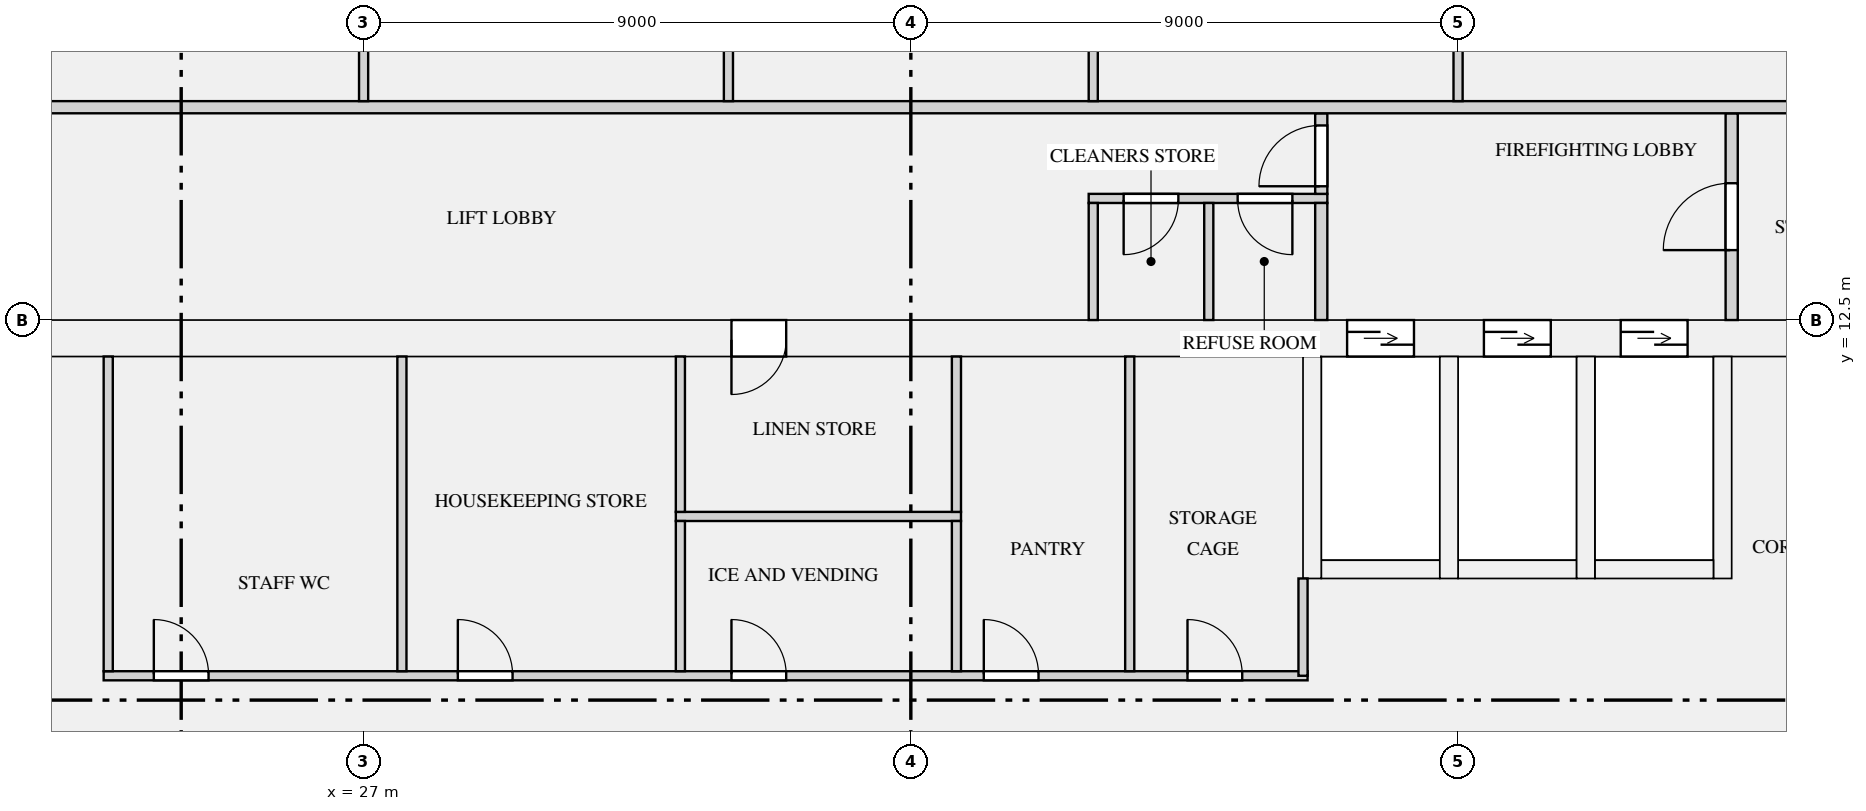
"""IFC4 building model, lengths in metres.
Left out: names, types, materials, properties, quantities, classifications, styles, units other than length and angle.
Written with IfcOpenShell. Run it as: python <this file> out.ifc"""

import sys

from ifc_helpers import new_model, si_unit, direction, frame, frame_2d, origin, place, context, subcontext, project, spatial, rectangle, extrude, element, fill, save


model = new_model("IFC4")
c1 = context("Model", 3, precision=1e-05, world=origin(), true_north=direction((0.0, 1.0)))
c2 = subcontext(c1, "Body", "Model", "MODEL_VIEW")
j1 = project(units=[si_unit("LENGTHUNIT", "METRE"), si_unit("PLANEANGLEUNIT", "RADIAN")], contexts=[c1])
p1 = place(None, origin())
s1 = spatial("IfcSite", under=j1, at=p1, CompositionType="ELEMENT")
p2 = place(p1, origin())
s2 = spatial("IfcBuilding", under=s1, at=p2, CompositionType="ELEMENT")
p3 = place(p2, frame((0.0, 0.0, 144.45)))
s3 = spatial("IfcBuildingStorey", under=s2, at=p3, CompositionType="ELEMENT", Elevation=144.45)
p4 = place(p3, frame((18.7, 12.2, 0.0), z_axis=(0.0, 0.0, 1.0), x_axis=(1.0, 0.0, 0.0)))
e1 = element("IfcWall", 1, at=p4, inside=s3, PredefinedType="SHEAR", context=c2, shape_type="SweptSolid", body=[
    extrude(rectangle(XDim=34.6, YDim=0.6, at=frame_2d((17.3, 0.0))), origin(), (0.0, 0.0, 1.0), 3.15),
])
p5 = place(p4, frame((24.475, 0.0, 0.0)))
e2 = element("IfcOpeningElement", 2, at=p5, cuts=e1, PredefinedType="OPENING", context=c2, shape_type="SweptSolid", body=[
    extrude(rectangle(XDim=1.1, YDim=2.1, at=frame_2d((0.55, 1.05))), frame((0.0, 0.31, 0.0), z_axis=(0.0, -1.0, 0.0), x_axis=(1.0, 0.0, 0.0)), (0.0, 0.0, 1.0), 0.62),
])
p6 = place(p4, frame((26.725, 0.0, 0.0)))
e3 = element("IfcOpeningElement", 3, at=p6, cuts=e1, PredefinedType="OPENING", context=c2, shape_type="SweptSolid", body=[
    extrude(rectangle(XDim=1.1, YDim=2.1, at=frame_2d((0.55, 1.05))), frame((0.0, 0.31, 0.0), z_axis=(0.0, -1.0, 0.0), x_axis=(1.0, 0.0, 0.0)), (0.0, 0.0, 1.0), 0.62),
])
p7 = place(p4, frame((28.975, 0.0, 0.0)))
e4 = element("IfcOpeningElement", 4, at=p7, cuts=e1, PredefinedType="OPENING", context=c2, shape_type="SweptSolid", body=[
    extrude(rectangle(XDim=1.1, YDim=2.1, at=frame_2d((0.55, 1.05))), frame((0.0, 0.31, 0.0), z_axis=(0.0, -1.0, 0.0), x_axis=(1.0, 0.0, 0.0)), (0.0, 0.0, 1.0), 0.62),
])
p8 = place(p4, frame((14.35, 0.0, 0.0)))
e5 = element("IfcOpeningElement", 5, at=p8, cuts=e1, PredefinedType="OPENING", context=c2, shape_type="SweptSolid", body=[
    extrude(rectangle(XDim=0.9, YDim=2.1, at=frame_2d((0.45, 1.05))), frame((0.0, 0.31, 0.0), z_axis=(0.0, -1.0, 0.0), x_axis=(1.0, 0.0, 0.0)), (0.0, 0.0, 1.0), 0.62),
])
p9 = place(p4, frame((1.45, 0.0, 0.0)))
e6 = element("IfcOpeningElement", 6, at=p9, cuts=e1, PredefinedType="OPENING", context=c2, shape_type="SweptSolid", body=[
    extrude(rectangle(XDim=1.2, YDim=2.1, at=frame_2d((0.6, 1.05))), frame((0.0, 0.31, 0.0), z_axis=(0.0, -1.0, 0.0), x_axis=(1.0, 0.0, 0.0)), (0.0, 0.0, 1.0), 0.62),
])
p10 = place(p4, frame((31.95, 0.0, 0.0)))
e7 = element("IfcOpeningElement", 7, at=p10, cuts=e1, PredefinedType="OPENING", context=c2, shape_type="SweptSolid", body=[
    extrude(rectangle(XDim=1.2, YDim=2.1, at=frame_2d((0.6, 1.05))), frame((0.0, 0.31, 0.0), z_axis=(0.0, -1.0, 0.0), x_axis=(1.0, 0.0, 0.0)), (0.0, 0.0, 1.0), 0.62),
])
p11 = place(p3, frame((42.75, 8.4, 0.0), z_axis=(0.0, 0.0, 1.0), x_axis=(1.0, 0.0, 0.0)))
e8 = element("IfcWall", 8, at=p11, inside=s3, PredefinedType="SHEAR", context=c2, shape_type="SweptSolid", body=[
    extrude(rectangle(XDim=1.95, YDim=0.3, at=frame_2d((0.975, 0.0))), origin(), (0.0, 0.0, 1.0), 3.15),
])
p12 = place(p3, frame((42.6, 8.25, 0.0), z_axis=(0.0, 0.0, 1.0), x_axis=(0.0, 1.0, 0.0)))
e9 = element("IfcWall", 9, at=p12, inside=s3, PredefinedType="SHEAR", context=c2, shape_type="SweptSolid", body=[
    extrude(rectangle(XDim=3.65, YDim=0.3, at=frame_2d((1.825, 0.0))), origin(), (0.0, 0.0, 1.0), 3.15),
])
p13 = place(p3, frame((45.0, 8.4, 0.0), z_axis=(0.0, 0.0, 1.0), x_axis=(1.0, 0.0, 0.0)))
e10 = element("IfcWall", 10, at=p13, inside=s3, PredefinedType="SHEAR", context=c2, shape_type="SweptSolid", body=[
    extrude(rectangle(XDim=1.95, YDim=0.3, at=frame_2d((0.975, 0.0))), origin(), (0.0, 0.0, 1.0), 3.15),
])
p14 = place(p3, frame((44.85, 8.25, 0.0), z_axis=(0.0, 0.0, 1.0), x_axis=(0.0, 1.0, 0.0)))
e11 = element("IfcWall", 11, at=p14, inside=s3, PredefinedType="SHEAR", context=c2, shape_type="SweptSolid", body=[
    extrude(rectangle(XDim=3.65, YDim=0.3, at=frame_2d((1.825, 0.0))), origin(), (0.0, 0.0, 1.0), 3.15),
])
p15 = place(p3, frame((47.25, 8.4, 0.0), z_axis=(0.0, 0.0, 1.0), x_axis=(1.0, 0.0, 0.0)))
e12 = element("IfcWall", 12, at=p15, inside=s3, PredefinedType="SHEAR", context=c2, shape_type="SweptSolid", body=[
    extrude(rectangle(XDim=1.95, YDim=0.3, at=frame_2d((0.975, 0.0))), origin(), (0.0, 0.0, 1.0), 3.15),
])
for number, where, z_axis, x_axis in (
    (13, (47.1, 8.25, 0.0), (0.0, 0.0, 1.0), (0.0, 1.0, 0.0)),
    (14, (49.35, 8.25, 0.0), (0.0, 0.0, 1.0), (0.0, 1.0, 0.0)),
):
    element("IfcWall", number, at=place(p3, frame(where, z_axis=z_axis, x_axis=x_axis)), inside=s3, PredefinedType="SHEAR", context=c2, shape_type="SweptSolid", body=[
        extrude(rectangle(XDim=3.65, YDim=0.3, at=frame_2d((1.825, 0.0))), origin(), (0.0, 0.0, 1.0), 3.15),
    ])
p16 = place(p3, frame((22.725, 6.65, 0.0), z_axis=(0.0, 0.0, 1.0), x_axis=(1.0, 0.0, 0.0)))
e15 = element("IfcWall", 15, at=p16, inside=s3, PredefinedType="PARTITIONING", context=c2, shape_type="SweptSolid", body=[
    extrude(rectangle(XDim=19.8, YDim=0.15, at=frame_2d((9.9, 0.0))), origin(), (0.0, 0.0, 1.0), 2.83),
])
p17 = place(p16, frame((0.825, 0.0, 0.0)))
e16 = element("IfcOpeningElement", 16, at=p17, cuts=e15, PredefinedType="OPENING", context=c2, shape_type="SweptSolid", body=[
    extrude(rectangle(XDim=0.9, YDim=2.1, at=frame_2d((0.45, 1.05))), frame((0.0, 0.085, 0.0), z_axis=(0.0, -1.0, 0.0), x_axis=(1.0, 0.0, 0.0)), (0.0, 0.0, 1.0), 0.17),
])
p18 = place(p16, frame((5.825, 0.0, 0.0)))
e17 = element("IfcOpeningElement", 17, at=p18, cuts=e15, PredefinedType="OPENING", context=c2, shape_type="SweptSolid", body=[
    extrude(rectangle(XDim=0.9, YDim=2.1, at=frame_2d((0.45, 1.05))), frame((0.0, 0.085, 0.0), z_axis=(0.0, -1.0, 0.0), x_axis=(1.0, 0.0, 0.0)), (0.0, 0.0, 1.0), 0.17),
])
p19 = place(p16, frame((10.325, 0.0, 0.0)))
e18 = element("IfcOpeningElement", 18, at=p19, cuts=e15, PredefinedType="OPENING", context=c2, shape_type="SweptSolid", body=[
    extrude(rectangle(XDim=0.9, YDim=2.1, at=frame_2d((0.45, 1.05))), frame((0.0, 0.085, 0.0), z_axis=(0.0, -1.0, 0.0), x_axis=(1.0, 0.0, 0.0)), (0.0, 0.0, 1.0), 0.17),
])
p20 = place(p16, frame((14.475, 0.0, 0.0)))
e19 = element("IfcOpeningElement", 19, at=p20, cuts=e15, PredefinedType="OPENING", context=c2, shape_type="SweptSolid", body=[
    extrude(rectangle(XDim=0.9, YDim=2.1, at=frame_2d((0.45, 1.05))), frame((0.0, 0.085, 0.0), z_axis=(0.0, -1.0, 0.0), x_axis=(1.0, 0.0, 0.0)), (0.0, 0.0, 1.0), 0.17),
])
p21 = place(p16, frame((17.825, 0.0, 0.0)))
e20 = element("IfcOpeningElement", 20, at=p21, cuts=e15, PredefinedType="OPENING", context=c2, shape_type="SweptSolid", body=[
    extrude(rectangle(XDim=0.9, YDim=2.1, at=frame_2d((0.45, 1.05))), frame((0.0, 0.085, 0.0), z_axis=(0.0, -1.0, 0.0), x_axis=(1.0, 0.0, 0.0)), (0.0, 0.0, 1.0), 0.17),
])
p22 = place(p3, frame((32.135, 9.27, 0.0), z_axis=(0.0, 0.0, 1.0), x_axis=(1.0, 0.0, 0.0)))
e21 = element("IfcWall", 21, at=p22, inside=s3, PredefinedType="PARTITIONING", context=c2, shape_type="SweptSolid", body=[
    extrude(rectangle(XDim=4.69, YDim=0.15, at=frame_2d((2.345, 0.0))), origin(), (0.0, 0.0, 1.0), 2.83),
])
p23 = place(p3, frame((38.925, 14.5, 0.0), z_axis=(0.0, 0.0, 1.0), x_axis=(1.0, 0.0, 0.0)))
e22 = element("IfcWall", 22, at=p23, inside=s3, PredefinedType="PARTITIONING", context=c2, shape_type="SweptSolid", body=[
    extrude(rectangle(XDim=3.925, YDim=0.15, at=frame_2d((1.962, 0.0))), origin(), (0.0, 0.0, 1.0), 2.83),
])
p24 = place(p23, frame((0.575, 0.0, 0.0)))
e23 = element("IfcOpeningElement", 23, at=p24, cuts=e22, PredefinedType="OPENING", context=c2, shape_type="SweptSolid", body=[
    extrude(rectangle(XDim=0.9, YDim=2.1, at=frame_2d((0.45, 1.05))), frame((0.0, 0.085, 0.0), z_axis=(0.0, -1.0, 0.0), x_axis=(1.0, 0.0, 0.0)), (0.0, 0.0, 1.0), 0.17),
])
p25 = place(p23, frame((2.45, 0.0, 0.0)))
e24 = element("IfcOpeningElement", 24, at=p25, cuts=e22, PredefinedType="OPENING", context=c2, shape_type="SweptSolid", body=[
    extrude(rectangle(XDim=0.9, YDim=2.1, at=frame_2d((0.45, 1.05))), frame((0.0, 0.085, 0.0), z_axis=(0.0, -1.0, 0.0), x_axis=(1.0, 0.0, 0.0)), (0.0, 0.0, 1.0), 0.17),
])
p26 = place(p3, frame((42.45, 6.65, 0.0), z_axis=(0.0, 0.0, 1.0), x_axis=(0.0, 1.0, 0.0)))
e25 = element("IfcWall", 25, at=p26, inside=s3, PredefinedType="PARTITIONING", context=c2, shape_type="SweptSolid", body=[
    extrude(rectangle(XDim=1.6, YDim=0.15, at=frame_2d((0.8, 0.0))), origin(), (0.0, 0.0, 1.0), 2.83),
])
for number, where, z_axis, x_axis in (
    (26, (22.8, 6.725, 0.0), (0.0, 0.0, 1.0), (0.0, 1.0, 0.0)),
    (27, (27.63, 6.725, 0.0), (0.0, 0.0, 1.0), (0.0, 1.0, 0.0)),
):
    element("IfcWall", number, at=place(p3, frame(where, z_axis=z_axis, x_axis=x_axis)), inside=s3, PredefinedType="PARTITIONING", context=c2, shape_type="SweptSolid", body=[
        extrude(rectangle(XDim=5.175, YDim=0.15, at=frame_2d((2.587, 0.0))), origin(), (0.0, 0.0, 1.0), 2.83),
    ])
for number, where, z_axis, x_axis in (
    (28, (32.21, 6.725, 0.0), (0.0, 0.0, 1.0), (0.0, 1.0, 0.0)),
    (29, (36.75, 6.725, 0.0), (0.0, 0.0, 1.0), (0.0, 1.0, 0.0)),
):
    element("IfcWall", number, at=place(p3, frame(where, z_axis=z_axis, x_axis=x_axis)), inside=s3, PredefinedType="PARTITIONING", context=c2, shape_type="SweptSolid", body=[
        extrude(rectangle(XDim=2.47, YDim=0.15, at=frame_2d((1.235, 0.0))), origin(), (0.0, 0.0, 1.0), 2.83),
    ])
p27 = place(p3, frame((39.6, 6.725, 0.0), z_axis=(0.0, 0.0, 1.0), x_axis=(0.0, 1.0, 0.0)))
e30 = element("IfcWall", 30, at=p27, inside=s3, PredefinedType="PARTITIONING", context=c2, shape_type="SweptSolid", body=[
    extrude(rectangle(XDim=5.175, YDim=0.15, at=frame_2d((2.587, 0.0))), origin(), (0.0, 0.0, 1.0), 2.83),
])
for number, where, z_axis, x_axis in (
    (31, (32.21, 9.345, 0.0), (0.0, 0.0, 1.0), (0.0, 1.0, 0.0)),
    (32, (36.75, 9.345, 0.0), (0.0, 0.0, 1.0), (0.0, 1.0, 0.0)),
):
    element("IfcWall", number, at=place(p3, frame(where, z_axis=z_axis, x_axis=x_axis)), inside=s3, PredefinedType="PARTITIONING", context=c2, shape_type="SweptSolid", body=[
        extrude(rectangle(XDim=2.555, YDim=0.15, at=frame_2d((1.277, 0.0))), origin(), (0.0, 0.0, 1.0), 2.83),
    ])
for number, where, z_axis, x_axis in (
    (33, (39.0, 12.5, 0.0), (0.0, 0.0, 1.0), (0.0, 1.0, 0.0)),
    (34, (40.9, 12.5, 0.0), (0.0, 0.0, 1.0), (0.0, 1.0, 0.0)),
):
    element("IfcWall", number, at=place(p3, frame(where, z_axis=z_axis, x_axis=x_axis)), inside=s3, PredefinedType="PARTITIONING", context=c2, shape_type="SweptSolid", body=[
        extrude(rectangle(XDim=1.925, YDim=0.15, at=frame_2d((0.962, 0.0))), origin(), (0.0, 0.0, 1.0), 2.83),
    ])
p28 = place(p3, frame((42.75, 12.5, 0.0), z_axis=(0.0, 0.0, 1.0), x_axis=(0.0, 1.0, 0.0)))
e35 = element("IfcWall", 35, at=p28, inside=s3, PredefinedType="PARTITIONING", context=c2, shape_type="SweptSolid", body=[
    extrude(rectangle(XDim=1.925, YDim=0.2, at=frame_2d((0.962, 0.0))), origin(), (0.0, 0.0, 1.0), 2.83),
])
p29 = place(p3, frame((49.5, 12.5, 0.0), z_axis=(0.0, 0.0, 1.0), x_axis=(0.0, 1.0, 0.0)))
e36 = element("IfcWall", 36, at=p29, inside=s3, PredefinedType="PARTITIONING", context=c2, shape_type="SweptSolid", body=[
    extrude(rectangle(XDim=3.4, YDim=0.2, at=frame_2d((1.7, 0.0))), origin(), (0.0, 0.0, 1.0), 2.83),
])
p30 = place(p29, frame((1.15, 0.0, 0.0)))
e37 = element("IfcOpeningElement", 37, at=p30, cuts=e36, PredefinedType="OPENING", context=c2, shape_type="SweptSolid", body=[
    extrude(rectangle(XDim=1.1, YDim=2.1, at=frame_2d((0.55, 1.05))), frame((0.0, 0.11, 0.0), z_axis=(0.0, -1.0, 0.0), x_axis=(1.0, 0.0, 0.0)), (0.0, 0.0, 1.0), 0.22),
])
p31 = place(p3, frame((42.75, 14.575, 0.0), z_axis=(0.0, 0.0, 1.0), x_axis=(0.0, 1.0, 0.0)))
e38 = element("IfcWall", 38, at=p31, inside=s3, PredefinedType="PARTITIONING", context=c2, shape_type="SweptSolid", body=[
    extrude(rectangle(XDim=1.325, YDim=0.2, at=frame_2d((0.663, 0.0))), origin(), (0.0, 0.0, 1.0), 2.83),
])
p32 = place(p31, frame((0.125, 0.0, 0.0)))
e39 = element("IfcOpeningElement", 39, at=p32, cuts=e38, PredefinedType="OPENING", context=c2, shape_type="SweptSolid", body=[
    extrude(rectangle(XDim=1.0, YDim=2.1, at=frame_2d((0.5, 1.05))), frame((0.0, 0.11, 0.0), z_axis=(0.0, -1.0, 0.0), x_axis=(1.0, 0.0, 0.0)), (0.0, 0.0, 1.0), 0.22),
])
p33 = place(p3, frame((17.9, 16.0, 0.0), z_axis=(0.0, 0.0, 1.0), x_axis=(1.0, 0.0, 0.0)))
e40 = element("IfcWall", 40, at=p33, inside=s3, PredefinedType="PARTITIONING", context=c2, shape_type="SweptSolid", body=[
    extrude(rectangle(XDim=36.2, YDim=0.2, at=frame_2d((18.1, 0.0))), origin(), (0.0, 0.0, 1.0), 2.83),
])
p34 = place(p33, frame((0.9, 0.0, 0.0)))
e41 = element("IfcOpeningElement", 41, at=p34, cuts=e40, PredefinedType="OPENING", context=c2, shape_type="SweptSolid", body=[
    extrude(rectangle(XDim=1.4, YDim=2.1, at=frame_2d((0.7, 1.05))), frame((0.0, 0.11, 0.0), z_axis=(0.0, -1.0, 0.0), x_axis=(1.0, 0.0, 0.0)), (0.0, 0.0, 1.0), 0.22),
])
p35 = place(p33, frame((33.9, 0.0, 0.0)))
e42 = element("IfcOpeningElement", 42, at=p35, cuts=e40, PredefinedType="OPENING", context=c2, shape_type="SweptSolid", body=[
    extrude(rectangle(XDim=1.4, YDim=2.1, at=frame_2d((0.7, 1.05))), frame((0.0, 0.11, 0.0), z_axis=(0.0, -1.0, 0.0), x_axis=(1.0, 0.0, 0.0)), (0.0, 0.0, 1.0), 0.22),
])
for number, where, z_axis, x_axis in (
    (43, (45.0, 16.1, 0.0), (0.0, 0.0, 1.0), (0.0, 1.0, 0.0)),
    (44, (27.0, 16.1, 0.0), (0.0, 0.0, 1.0), (0.0, 1.0, 0.0)),
    (45, (33.0, 16.1, 0.0), (0.0, 0.0, 1.0), (0.0, 1.0, 0.0)),
    (46, (39.0, 16.1, 0.0), (0.0, 0.0, 1.0), (0.0, 1.0, 0.0)),
):
    element("IfcWall", number, at=place(p3, frame(where, z_axis=z_axis, x_axis=x_axis)), inside=s3, PredefinedType="PARTITIONING", context=c2, shape_type="SweptSolid", body=[
        extrude(rectangle(XDim=4.825, YDim=0.15, at=frame_2d((2.413, 0.0))), origin(), (0.0, 0.0, 1.0), 2.83),
    ])
p36 = place(p5, origin())
e47 = element("IfcDoor", 47, at=p36, inside=s3, OperationType="DOUBLE_DOOR_SLIDING", PredefinedType="DOOR", context=c2, shape_type="SweptSolid", body=[
    extrude(rectangle(XDim=1.1, YDim=2.1, at=frame_2d((0.55, 1.05))), frame((0.0, 0.025, 0.0), z_axis=(0.0, -1.0, 0.0), x_axis=(1.0, 0.0, 0.0)), (0.0, 0.0, 1.0), 0.05),
])
fill(e2, e47)
p37 = place(p6, origin())
e48 = element("IfcDoor", 48, at=p37, inside=s3, OperationType="DOUBLE_DOOR_SLIDING", PredefinedType="DOOR", context=c2, shape_type="SweptSolid", body=[
    extrude(rectangle(XDim=1.1, YDim=2.1, at=frame_2d((0.55, 1.05))), frame((0.0, 0.025, 0.0), z_axis=(0.0, -1.0, 0.0), x_axis=(1.0, 0.0, 0.0)), (0.0, 0.0, 1.0), 0.05),
])
fill(e3, e48)
p38 = place(p7, origin())
e49 = element("IfcDoor", 49, at=p38, inside=s3, OperationType="DOUBLE_DOOR_SLIDING", PredefinedType="DOOR", context=c2, shape_type="SweptSolid", body=[
    extrude(rectangle(XDim=1.1, YDim=2.1, at=frame_2d((0.55, 1.05))), frame((0.0, 0.025, 0.0), z_axis=(0.0, -1.0, 0.0), x_axis=(1.0, 0.0, 0.0)), (0.0, 0.0, 1.0), 0.05),
])
fill(e4, e49)
p39 = place(p24, frame((0.9, 0.0, 0.0), z_axis=(0.0, 0.0, 1.0), x_axis=(-1.0, 0.0, 0.0)))
e50 = element("IfcDoor", 50, at=p39, inside=s3, OperationType="SINGLE_SWING_RIGHT", PredefinedType="DOOR", context=c2, shape_type="SweptSolid", body=[
    extrude(rectangle(XDim=0.9, YDim=2.1, at=frame_2d((0.45, 1.05))), frame((0.0, 0.025, 0.0), z_axis=(0.0, -1.0, 0.0), x_axis=(1.0, 0.0, 0.0)), (0.0, 0.0, 1.0), 0.05),
])
fill(e23, e50)
p40 = place(p25, frame((0.9, 0.0, 0.0), z_axis=(0.0, 0.0, 1.0), x_axis=(-1.0, 0.0, 0.0)))
e51 = element("IfcDoor", 51, at=p40, inside=s3, OperationType="SINGLE_SWING_LEFT", PredefinedType="DOOR", context=c2, shape_type="SweptSolid", body=[
    extrude(rectangle(XDim=0.9, YDim=2.1, at=frame_2d((0.45, 1.05))), frame((0.0, 0.025, 0.0), z_axis=(0.0, -1.0, 0.0), x_axis=(1.0, 0.0, 0.0)), (0.0, 0.0, 1.0), 0.05),
])
fill(e24, e51)
p41 = place(p17, origin())
e52 = element("IfcDoor", 52, at=p41, inside=s3, OperationType="SINGLE_SWING_LEFT", PredefinedType="DOOR", context=c2, shape_type="SweptSolid", body=[
    extrude(rectangle(XDim=0.9, YDim=2.1, at=frame_2d((0.45, 1.05))), frame((0.0, 0.025, 0.0), z_axis=(0.0, -1.0, 0.0), x_axis=(1.0, 0.0, 0.0)), (0.0, 0.0, 1.0), 0.05),
])
fill(e16, e52)
p42 = place(p18, origin())
e53 = element("IfcDoor", 53, at=p42, inside=s3, OperationType="SINGLE_SWING_LEFT", PredefinedType="DOOR", context=c2, shape_type="SweptSolid", body=[
    extrude(rectangle(XDim=0.9, YDim=2.1, at=frame_2d((0.45, 1.05))), frame((0.0, 0.025, 0.0), z_axis=(0.0, -1.0, 0.0), x_axis=(1.0, 0.0, 0.0)), (0.0, 0.0, 1.0), 0.05),
])
fill(e17, e53)
p43 = place(p19, origin())
e54 = element("IfcDoor", 54, at=p43, inside=s3, OperationType="SINGLE_SWING_LEFT", PredefinedType="DOOR", context=c2, shape_type="SweptSolid", body=[
    extrude(rectangle(XDim=0.9, YDim=2.1, at=frame_2d((0.45, 1.05))), frame((0.0, 0.025, 0.0), z_axis=(0.0, -1.0, 0.0), x_axis=(1.0, 0.0, 0.0)), (0.0, 0.0, 1.0), 0.05),
])
fill(e18, e54)
p44 = place(p8, frame((0.9, 0.0, 0.0), z_axis=(0.0, 0.0, 1.0), x_axis=(-1.0, 0.0, 0.0)))
e55 = element("IfcDoor", 55, at=p44, inside=s3, OperationType="SINGLE_SWING_RIGHT", PredefinedType="DOOR", context=c2, shape_type="SweptSolid", body=[
    extrude(rectangle(XDim=0.9, YDim=2.1, at=frame_2d((0.45, 1.05))), frame((0.0, 0.025, 0.0), z_axis=(0.0, -1.0, 0.0), x_axis=(1.0, 0.0, 0.0)), (0.0, 0.0, 1.0), 0.05),
])
fill(e5, e55)
p45 = place(p20, origin())
e56 = element("IfcDoor", 56, at=p45, inside=s3, OperationType="SINGLE_SWING_LEFT", PredefinedType="DOOR", context=c2, shape_type="SweptSolid", body=[
    extrude(rectangle(XDim=0.9, YDim=2.1, at=frame_2d((0.45, 1.05))), frame((0.0, 0.025, 0.0), z_axis=(0.0, -1.0, 0.0), x_axis=(1.0, 0.0, 0.0)), (0.0, 0.0, 1.0), 0.05),
])
fill(e19, e56)
p46 = place(p21, origin())
e57 = element("IfcDoor", 57, at=p46, inside=s3, OperationType="SINGLE_SWING_LEFT", PredefinedType="DOOR", context=c2, shape_type="SweptSolid", body=[
    extrude(rectangle(XDim=0.9, YDim=2.1, at=frame_2d((0.45, 1.05))), frame((0.0, 0.025, 0.0), z_axis=(0.0, -1.0, 0.0), x_axis=(1.0, 0.0, 0.0)), (0.0, 0.0, 1.0), 0.05),
])
fill(e20, e57)
p47 = place(p32, origin())
e58 = element("IfcDoor", 58, at=p47, inside=s3, OperationType="SINGLE_SWING_LEFT", PredefinedType="DOOR", context=c2, shape_type="SweptSolid", body=[
    extrude(rectangle(XDim=1.0, YDim=2.1, at=frame_2d((0.5, 1.05))), frame((0.0, 0.025, 0.0), z_axis=(0.0, -1.0, 0.0), x_axis=(1.0, 0.0, 0.0)), (0.0, 0.0, 1.0), 0.05),
])
fill(e39, e58)
p48 = place(p30, origin())
e59 = element("IfcDoor", 59, at=p48, inside=s3, OperationType="SINGLE_SWING_LEFT", PredefinedType="DOOR", context=c2, shape_type="SweptSolid", body=[
    extrude(rectangle(XDim=1.1, YDim=2.1, at=frame_2d((0.55, 1.05))), frame((0.0, 0.025, 0.0), z_axis=(0.0, -1.0, 0.0), x_axis=(1.0, 0.0, 0.0)), (0.0, 0.0, 1.0), 0.05),
])
fill(e37, e59)
save(model, sys.argv[1])
